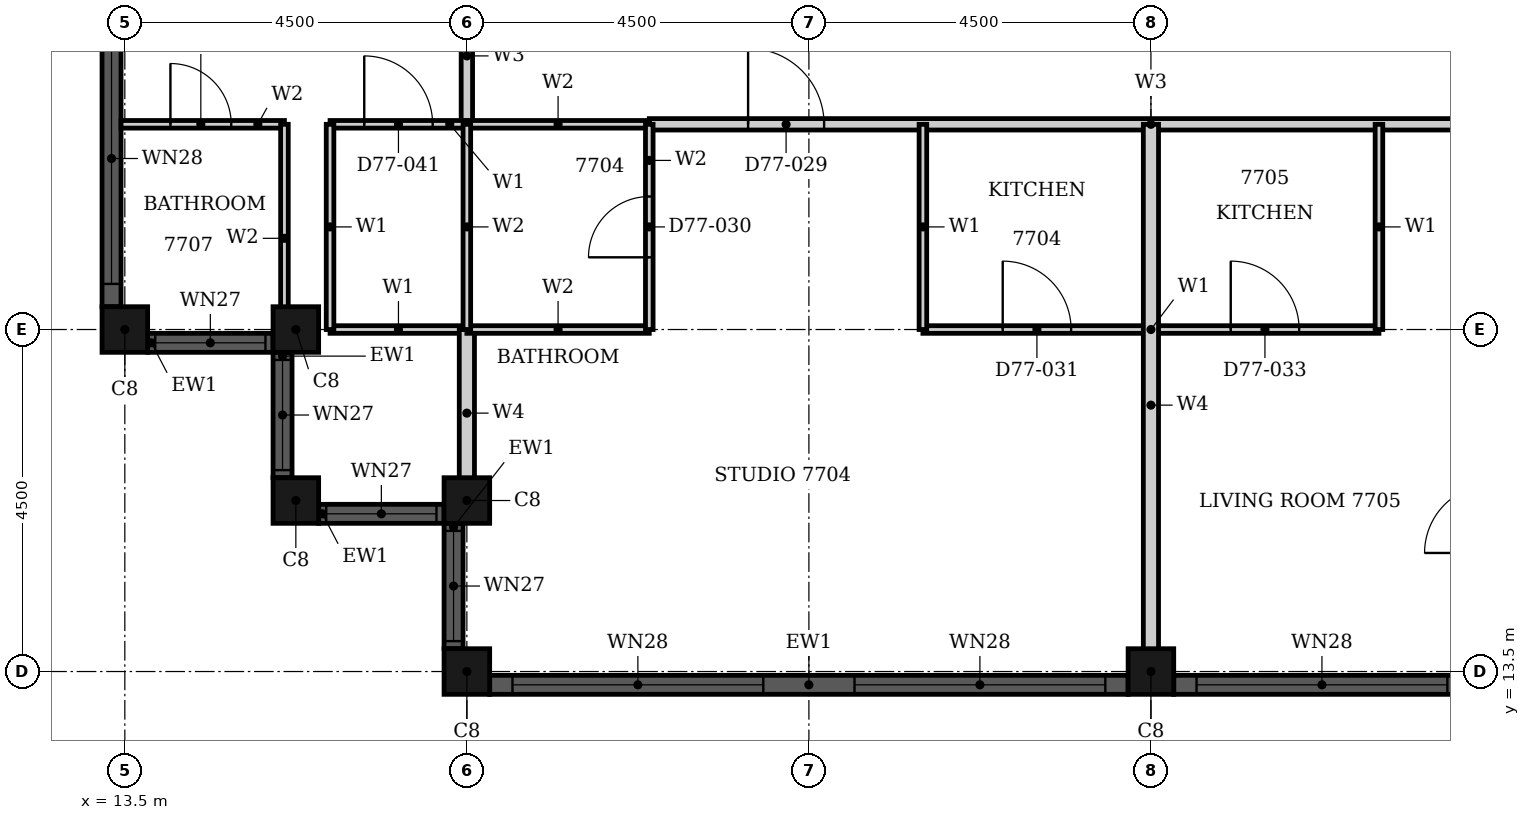
"""IFC4 building model, lengths in metres.
Left out: names, types, materials, properties, quantities, classifications, styles, units other than length and angle.
Written with IfcOpenShell. Run it as: python <this file> out.ifc"""

import sys

from ifc_helpers import new_model, si_unit, direction, frame, frame_2d, origin, origin_2d, place, context, subcontext, project, spatial, rectangle, hollow_rectangle, extrude, element, fill, save


model = new_model("IFC4")
c1 = context("Model", 3, precision=1e-05, world=origin(), true_north=direction((0.0, 1.0)))
c2 = subcontext(c1, "Body", "Model", "MODEL_VIEW")
j1 = project(units=[si_unit("LENGTHUNIT", "METRE"), si_unit("PLANEANGLEUNIT", "RADIAN")], contexts=[c1])
p1 = place(None, origin())
s1 = spatial("IfcSite", under=j1, at=p1, CompositionType="ELEMENT")
p2 = place(p1, origin())
s2 = spatial("IfcBuilding", under=s1, at=p2, CompositionType="ELEMENT")
p3 = place(p2, frame((0.0, 0.0, 301.9)))
s3 = spatial("IfcBuildingStorey", under=s2, at=p3, CompositionType="ELEMENT", Elevation=301.9)
for number, where, z_axis, x_axis in (
    (1, (13.5, 18.0, 0.0), (0.0, 0.0, 1.0), (1.0, 0.0, 0.0)),
    (2, (15.75, 18.0, 0.0), (0.0, 0.0, 1.0), (1.0, 0.0, 0.0)),
    (3, (15.75, 15.75, 0.0), (0.0, 0.0, 1.0), (1.0, 0.0, 0.0)),
    (4, (18.0, 15.75, 0.0), (0.0, 0.0, 1.0), (1.0, 0.0, 0.0)),
    (5, (18.0, 13.5, 0.0), (0.0, 0.0, 1.0), (1.0, 0.0, 0.0)),
    (6, (27.0, 13.5, 0.0), (0.0, 0.0, 1.0), (1.0, 0.0, 0.0)),
):
    element("IfcColumn", number, at=place(p3, frame(where, z_axis=z_axis, x_axis=x_axis)), inside=s3, PredefinedType="COLUMN", context=c2, shape_type="SweptSolid", body=[
        extrude(hollow_rectangle(XDim=0.6, YDim=0.6, WallThickness=0.02, at=origin_2d()), origin(), (0.0, 0.0, 1.0), 3.7),
    ])
p4 = place(p3, frame((13.325, 26.7, 0.0), z_axis=(0.0, 0.0, 1.0), x_axis=(0.0, -1.0, 0.0)))
e7 = element("IfcWall", 7, at=p4, inside=s3, PredefinedType="SOLIDWALL", context=c2, shape_type="SweptSolid", body=[
    extrude(rectangle(XDim=8.4, YDim=0.25, at=frame_2d((4.2, 0.0))), origin(), (0.0, 0.0, 1.0), 3.7),
])
p5 = place(p4, frame((0.3, 0.0, 0.45)))
e8 = element("IfcOpeningElement", 8, at=p5, cuts=e7, PredefinedType="OPENING", context=c2, shape_type="SweptSolid", body=[
    extrude(rectangle(XDim=3.3, YDim=1.8, at=frame_2d((1.65, 0.9))), frame((0.0, 0.135, 0.0), z_axis=(0.0, -1.0, 0.0), x_axis=(1.0, 0.0, 0.0)), (0.0, 0.0, 1.0), 0.27),
])
p6 = place(p4, frame((4.8, 0.0, 0.45)))
e9 = element("IfcOpeningElement", 9, at=p6, cuts=e7, PredefinedType="OPENING", context=c2, shape_type="SweptSolid", body=[
    extrude(rectangle(XDim=3.3, YDim=1.8, at=frame_2d((1.65, 0.9))), frame((0.0, 0.135, 0.0), z_axis=(0.0, -1.0, 0.0), x_axis=(1.0, 0.0, 0.0)), (0.0, 0.0, 1.0), 0.27),
])
p7 = place(p3, frame((13.8, 17.825, 0.0), z_axis=(0.0, 0.0, 1.0), x_axis=(1.0, 0.0, 0.0)))
e10 = element("IfcWall", 10, at=p7, inside=s3, PredefinedType="SOLIDWALL", context=c2, shape_type="SweptSolid", body=[
    extrude(rectangle(XDim=1.65, YDim=0.25, at=frame_2d((0.825, 0.0))), origin(), (0.0, 0.0, 1.0), 3.7),
])
p8 = place(p7, frame((0.1, 0.0, 0.9)))
e11 = element("IfcOpeningElement", 11, at=p8, cuts=e10, PredefinedType="OPENING", context=c2, shape_type="SweptSolid", body=[
    extrude(rectangle(XDim=1.45, YDim=1.35, at=frame_2d((0.725, 0.675))), frame((0.0, 0.135, 0.0), z_axis=(0.0, -1.0, 0.0), x_axis=(1.0, 0.0, 0.0)), (0.0, 0.0, 1.0), 0.27),
])
p9 = place(p3, frame((15.575, 17.7, 0.0), z_axis=(0.0, 0.0, 1.0), x_axis=(0.0, -1.0, 0.0)))
e12 = element("IfcWall", 12, at=p9, inside=s3, PredefinedType="SOLIDWALL", context=c2, shape_type="SweptSolid", body=[
    extrude(rectangle(XDim=1.65, YDim=0.25, at=frame_2d((0.825, 0.0))), origin(), (0.0, 0.0, 1.0), 3.7),
])
p10 = place(p9, frame((0.1, 0.0, 0.9)))
e13 = element("IfcOpeningElement", 13, at=p10, cuts=e12, PredefinedType="OPENING", context=c2, shape_type="SweptSolid", body=[
    extrude(rectangle(XDim=1.45, YDim=1.35, at=frame_2d((0.725, 0.675))), frame((0.0, 0.135, 0.0), z_axis=(0.0, -1.0, 0.0), x_axis=(1.0, 0.0, 0.0)), (0.0, 0.0, 1.0), 0.27),
])
p11 = place(p3, frame((16.05, 15.575, 0.0), z_axis=(0.0, 0.0, 1.0), x_axis=(1.0, 0.0, 0.0)))
e14 = element("IfcWall", 14, at=p11, inside=s3, PredefinedType="SOLIDWALL", context=c2, shape_type="SweptSolid", body=[
    extrude(rectangle(XDim=1.65, YDim=0.25, at=frame_2d((0.825, 0.0))), origin(), (0.0, 0.0, 1.0), 3.7),
])
p12 = place(p11, frame((0.1, 0.0, 0.9)))
e15 = element("IfcOpeningElement", 15, at=p12, cuts=e14, PredefinedType="OPENING", context=c2, shape_type="SweptSolid", body=[
    extrude(rectangle(XDim=1.45, YDim=1.35, at=frame_2d((0.725, 0.675))), frame((0.0, 0.135, 0.0), z_axis=(0.0, -1.0, 0.0), x_axis=(1.0, 0.0, 0.0)), (0.0, 0.0, 1.0), 0.27),
])
p13 = place(p3, frame((17.825, 15.45, 0.0), z_axis=(0.0, 0.0, 1.0), x_axis=(0.0, -1.0, 0.0)))
e16 = element("IfcWall", 16, at=p13, inside=s3, PredefinedType="SOLIDWALL", context=c2, shape_type="SweptSolid", body=[
    extrude(rectangle(XDim=1.65, YDim=0.25, at=frame_2d((0.825, 0.0))), origin(), (0.0, 0.0, 1.0), 3.7),
])
p14 = place(p13, frame((0.1, 0.0, 0.9)))
e17 = element("IfcOpeningElement", 17, at=p14, cuts=e16, PredefinedType="OPENING", context=c2, shape_type="SweptSolid", body=[
    extrude(rectangle(XDim=1.45, YDim=1.35, at=frame_2d((0.725, 0.675))), frame((0.0, 0.135, 0.0), z_axis=(0.0, -1.0, 0.0), x_axis=(1.0, 0.0, 0.0)), (0.0, 0.0, 1.0), 0.27),
])
p15 = place(p3, frame((18.3, 13.325, 0.0), z_axis=(0.0, 0.0, 1.0), x_axis=(1.0, 0.0, 0.0)))
e18 = element("IfcWall", 18, at=p15, inside=s3, PredefinedType="SOLIDWALL", context=c2, shape_type="SweptSolid", body=[
    extrude(rectangle(XDim=8.4, YDim=0.25, at=frame_2d((4.2, 0.0))), origin(), (0.0, 0.0, 1.0), 3.7),
])
p16 = place(p15, frame((0.3, 0.0, 0.45)))
e19 = element("IfcOpeningElement", 19, at=p16, cuts=e18, PredefinedType="OPENING", context=c2, shape_type="SweptSolid", body=[
    extrude(rectangle(XDim=3.3, YDim=1.8, at=frame_2d((1.65, 0.9))), frame((0.0, 0.135, 0.0), z_axis=(0.0, -1.0, 0.0), x_axis=(1.0, 0.0, 0.0)), (0.0, 0.0, 1.0), 0.27),
])
p17 = place(p15, frame((4.8, 0.0, 0.45)))
e20 = element("IfcOpeningElement", 20, at=p17, cuts=e18, PredefinedType="OPENING", context=c2, shape_type="SweptSolid", body=[
    extrude(rectangle(XDim=3.3, YDim=1.8, at=frame_2d((1.65, 0.9))), frame((0.0, 0.135, 0.0), z_axis=(0.0, -1.0, 0.0), x_axis=(1.0, 0.0, 0.0)), (0.0, 0.0, 1.0), 0.27),
])
p18 = place(p3, frame((27.3, 13.325, 0.0), z_axis=(0.0, 0.0, 1.0), x_axis=(1.0, 0.0, 0.0)))
e21 = element("IfcWall", 21, at=p18, inside=s3, PredefinedType="SOLIDWALL", context=c2, shape_type="SweptSolid", body=[
    extrude(rectangle(XDim=8.4, YDim=0.25, at=frame_2d((4.2, 0.0))), origin(), (0.0, 0.0, 1.0), 3.7),
])
p19 = place(p18, frame((0.3, 0.0, 0.45)))
e22 = element("IfcOpeningElement", 22, at=p19, cuts=e21, PredefinedType="OPENING", context=c2, shape_type="SweptSolid", body=[
    extrude(rectangle(XDim=3.3, YDim=1.8, at=frame_2d((1.65, 0.9))), frame((0.0, 0.135, 0.0), z_axis=(0.0, -1.0, 0.0), x_axis=(1.0, 0.0, 0.0)), (0.0, 0.0, 1.0), 0.27),
])
p20 = place(p18, frame((4.8, 0.0, 0.45)))
e23 = element("IfcOpeningElement", 23, at=p20, cuts=e21, PredefinedType="OPENING", context=c2, shape_type="SweptSolid", body=[
    extrude(rectangle(XDim=3.3, YDim=1.8, at=frame_2d((1.65, 0.9))), frame((0.0, 0.135, 0.0), z_axis=(0.0, -1.0, 0.0), x_axis=(1.0, 0.0, 0.0)), (0.0, 0.0, 1.0), 0.27),
])
p21 = place(p3, frame((20.4, 20.7, 0.0), z_axis=(0.0, 0.0, 1.0), x_axis=(1.0, 0.0, 0.0)))
e24 = element("IfcWall", 24, at=p21, inside=s3, PredefinedType="PARTITIONING", context=c2, shape_type="SweptSolid", body=[
    extrude(rectangle(XDim=13.2, YDim=0.15, at=frame_2d((6.6, 0.0))), origin(), (0.0, 0.0, 1.0), 3.2),
])
p22 = place(p21, frame((1.3, 0.0, 0.0)))
e25 = element("IfcOpeningElement", 25, at=p22, cuts=e24, PredefinedType="OPENING", context=c2, shape_type="SweptSolid", body=[
    extrude(rectangle(XDim=1.0, YDim=2.2, at=frame_2d((0.5, 1.1))), frame((0.0, 0.085, 0.0), z_axis=(0.0, -1.0, 0.0), x_axis=(1.0, 0.0, 0.0)), (0.0, 0.0, 1.0), 0.17),
])
p23 = place(p21, frame((10.9, 0.0, 0.0)))
e26 = element("IfcOpeningElement", 26, at=p23, cuts=e24, PredefinedType="OPENING", context=c2, shape_type="SweptSolid", body=[
    extrude(rectangle(XDim=1.0, YDim=2.2, at=frame_2d((0.5, 1.1))), frame((0.0, 0.085, 0.0), z_axis=(0.0, -1.0, 0.0), x_axis=(1.0, 0.0, 0.0)), (0.0, 0.0, 1.0), 0.17),
])
p24 = place(p3, frame((18.0, 20.7, 0.0), z_axis=(0.0, 0.0, 1.0), x_axis=(0.0, 1.0, 0.0)))
e27 = element("IfcWall", 27, at=p24, inside=s3, PredefinedType="PARTITIONING", context=c2, shape_type="SweptSolid", body=[
    extrude(rectangle(XDim=1.8, YDim=0.15, at=frame_2d((0.9, 0.0))), origin(), (0.0, 0.0, 1.0), 3.2),
])
p25 = place(p3, frame((24.0, 18.0, 0.0), z_axis=(0.0, 0.0, 1.0), x_axis=(1.0, 0.0, 0.0)))
e28 = element("IfcWall", 28, at=p25, inside=s3, PredefinedType="PARTITIONING", context=c2, shape_type="SweptSolid", body=[
    extrude(rectangle(XDim=6.0, YDim=0.1, at=frame_2d((3.0, 0.0))), origin(), (0.0, 0.0, 1.0), 3.2),
])
p26 = place(p25, frame((1.05, 0.0, 0.0)))
e29 = element("IfcOpeningElement", 29, at=p26, cuts=e28, PredefinedType="OPENING", context=c2, shape_type="SweptSolid", body=[
    extrude(rectangle(XDim=0.9, YDim=2.1, at=frame_2d((0.45, 1.05))), frame((0.0, 0.06, 0.0), z_axis=(0.0, -1.0, 0.0), x_axis=(1.0, 0.0, 0.0)), (0.0, 0.0, 1.0), 0.12),
])
p27 = place(p25, frame((4.05, 0.0, 0.0)))
e30 = element("IfcOpeningElement", 30, at=p27, cuts=e28, PredefinedType="OPENING", context=c2, shape_type="SweptSolid", body=[
    extrude(rectangle(XDim=0.9, YDim=2.1, at=frame_2d((0.45, 1.05))), frame((0.0, 0.06, 0.0), z_axis=(0.0, -1.0, 0.0), x_axis=(1.0, 0.0, 0.0)), (0.0, 0.0, 1.0), 0.12),
])
p28 = place(p3, frame((16.2, 18.0, 0.0), z_axis=(0.0, 0.0, 1.0), x_axis=(1.0, 0.0, 0.0)))
e31 = element("IfcWall", 31, at=p28, inside=s3, PredefinedType="PARTITIONING", context=c2, shape_type="SweptSolid", body=[
    extrude(rectangle(XDim=1.8, YDim=0.1, at=frame_2d((0.9, 0.0))), origin(), (0.0, 0.0, 1.0), 3.2),
])
p29 = place(p3, frame((16.2, 20.7, 0.0), z_axis=(0.0, 0.0, 1.0), x_axis=(1.0, 0.0, 0.0)))
e32 = element("IfcWall", 32, at=p29, inside=s3, PredefinedType="PARTITIONING", context=c2, shape_type="SweptSolid", body=[
    extrude(rectangle(XDim=1.8, YDim=0.1, at=frame_2d((0.9, 0.0))), origin(), (0.0, 0.0, 1.0), 3.2),
])
p30 = place(p29, frame((0.45, 0.0, 0.0)))
e33 = element("IfcOpeningElement", 33, at=p30, cuts=e32, PredefinedType="OPENING", context=c2, shape_type="SweptSolid", body=[
    extrude(rectangle(XDim=0.9, YDim=2.1, at=frame_2d((0.45, 1.05))), frame((0.0, 0.06, 0.0), z_axis=(0.0, -1.0, 0.0), x_axis=(1.0, 0.0, 0.0)), (0.0, 0.0, 1.0), 0.12),
])
for number, where, z_axis, x_axis in (
    (34, (16.2, 18.0, 0.0), (0.0, 0.0, 1.0), (0.0, 1.0, 0.0)),
    (35, (24.0, 18.0, 0.0), (0.0, 0.0, 1.0), (0.0, 1.0, 0.0)),
    (36, (30.0, 18.0, 0.0), (0.0, 0.0, 1.0), (0.0, 1.0, 0.0)),
):
    element("IfcWall", number, at=place(p3, frame(where, z_axis=z_axis, x_axis=x_axis)), inside=s3, PredefinedType="PARTITIONING", context=c2, shape_type="SweptSolid", body=[
        extrude(rectangle(XDim=2.7, YDim=0.1, at=frame_2d((1.35, 0.0))), origin(), (0.0, 0.0, 1.0), 3.2),
    ])
p31 = place(p3, frame((18.0, 15.8, 0.0), z_axis=(0.0, 0.0, 1.0), x_axis=(0.0, 1.0, 0.0)))
e37 = element("IfcWall", 37, at=p31, inside=s3, PredefinedType="PARTITIONING", context=c2, shape_type="SweptSolid", body=[
    extrude(rectangle(XDim=2.2, YDim=0.2, at=frame_2d((1.1, 0.0))), origin(), (0.0, 0.0, 1.0), 3.2),
])
p32 = place(p3, frame((27.0, 13.31, 0.0), z_axis=(0.0, 0.0, 1.0), x_axis=(0.0, 1.0, 0.0)))
e38 = element("IfcWall", 38, at=p32, inside=s3, PredefinedType="PARTITIONING", context=c2, shape_type="SweptSolid", body=[
    extrude(rectangle(XDim=7.39, YDim=0.2, at=frame_2d((3.695, 0.0))), origin(), (0.0, 0.0, 1.0), 3.2),
])
for number, where, z_axis, x_axis in (
    (39, (18.0, 18.0, 0.0), (0.0, 0.0, 1.0), (1.0, 0.0, 0.0)),
    (40, (18.0, 20.7, 0.0), (0.0, 0.0, 1.0), (1.0, 0.0, 0.0)),
):
    element("IfcWall", number, at=place(p3, frame(where, z_axis=z_axis, x_axis=x_axis)), inside=s3, PredefinedType="PARTITIONING", context=c2, shape_type="SweptSolid", body=[
        extrude(rectangle(XDim=2.4, YDim=0.1, at=frame_2d((1.2, 0.0))), origin(), (0.0, 0.0, 1.0), 3.2),
    ])
p33 = place(p3, frame((13.45, 20.7, 0.0), z_axis=(0.0, 0.0, 1.0), x_axis=(1.0, 0.0, 0.0)))
e41 = element("IfcWall", 41, at=p33, inside=s3, PredefinedType="PARTITIONING", context=c2, shape_type="SweptSolid", body=[
    extrude(rectangle(XDim=2.15, YDim=0.1, at=frame_2d((1.075, 0.0))), origin(), (0.0, 0.0, 1.0), 3.2),
])
p34 = place(p33, frame((0.65, 0.0, 0.0)))
e42 = element("IfcOpeningElement", 42, at=p34, cuts=e41, PredefinedType="OPENING", context=c2, shape_type="SweptSolid", body=[
    extrude(rectangle(XDim=0.8, YDim=2.1, at=frame_2d((0.4, 1.05))), frame((0.0, 0.06, 0.0), z_axis=(0.0, -1.0, 0.0), x_axis=(1.0, 0.0, 0.0)), (0.0, 0.0, 1.0), 0.12),
])
p35 = place(p3, frame((15.6, 17.7, 0.0), z_axis=(0.0, 0.0, 1.0), x_axis=(0.0, 1.0, 0.0)))
e43 = element("IfcWall", 43, at=p35, inside=s3, PredefinedType="PARTITIONING", context=c2, shape_type="SweptSolid", body=[
    extrude(rectangle(XDim=3.0, YDim=0.1, at=frame_2d((1.5, 0.0))), origin(), (0.0, 0.0, 1.0), 3.2),
])
p36 = place(p3, frame((18.0, 18.0, 0.0), z_axis=(0.0, 0.0, 1.0), x_axis=(0.0, 1.0, 0.0)))
e44 = element("IfcWall", 44, at=p36, inside=s3, PredefinedType="PARTITIONING", context=c2, shape_type="SweptSolid", body=[
    extrude(rectangle(XDim=2.7, YDim=0.1, at=frame_2d((1.35, 0.0))), origin(), (0.0, 0.0, 1.0), 3.2),
])
p37 = place(p3, frame((20.4, 18.0, 0.0), z_axis=(0.0, 0.0, 1.0), x_axis=(0.0, 1.0, 0.0)))
e45 = element("IfcWall", 45, at=p37, inside=s3, PredefinedType="PARTITIONING", context=c2, shape_type="SweptSolid", body=[
    extrude(rectangle(XDim=2.7, YDim=0.1, at=frame_2d((1.35, 0.0))), origin(), (0.0, 0.0, 1.0), 3.2),
])
p38 = place(p37, frame((0.95, 0.0, 0.0)))
e46 = element("IfcOpeningElement", 46, at=p38, cuts=e45, PredefinedType="OPENING", context=c2, shape_type="SweptSolid", body=[
    extrude(rectangle(XDim=0.8, YDim=2.1, at=frame_2d((0.4, 1.05))), frame((0.0, 0.06, 0.0), z_axis=(0.0, -1.0, 0.0), x_axis=(1.0, 0.0, 0.0)), (0.0, 0.0, 1.0), 0.12),
])
p39 = place(p6, origin())
e47 = element("IfcWindow", 47, at=p39, inside=s3, PartitioningType="SINGLE_PANEL", PredefinedType="WINDOW", context=c2, shape_type="SweptSolid", body=[
    extrude(rectangle(XDim=3.3, YDim=1.8, at=frame_2d((1.65, 0.9))), frame((0.0, 0.03, 0.0), z_axis=(0.0, -1.0, 0.0), x_axis=(1.0, 0.0, 0.0)), (0.0, 0.0, 1.0), 0.06),
])
fill(e9, e47)
p40 = place(p8, origin())
e48 = element("IfcWindow", 48, at=p40, inside=s3, PartitioningType="SINGLE_PANEL", PredefinedType="WINDOW", context=c2, shape_type="SweptSolid", body=[
    extrude(rectangle(XDim=1.45, YDim=1.35, at=frame_2d((0.725, 0.675))), frame((0.0, 0.03, 0.0), z_axis=(0.0, -1.0, 0.0), x_axis=(1.0, 0.0, 0.0)), (0.0, 0.0, 1.0), 0.06),
])
fill(e11, e48)
p41 = place(p10, origin())
e49 = element("IfcWindow", 49, at=p41, inside=s3, PartitioningType="SINGLE_PANEL", PredefinedType="WINDOW", context=c2, shape_type="SweptSolid", body=[
    extrude(rectangle(XDim=1.45, YDim=1.35, at=frame_2d((0.725, 0.675))), frame((0.0, 0.03, 0.0), z_axis=(0.0, -1.0, 0.0), x_axis=(1.0, 0.0, 0.0)), (0.0, 0.0, 1.0), 0.06),
])
fill(e13, e49)
p42 = place(p12, origin())
e50 = element("IfcWindow", 50, at=p42, inside=s3, PartitioningType="SINGLE_PANEL", PredefinedType="WINDOW", context=c2, shape_type="SweptSolid", body=[
    extrude(rectangle(XDim=1.45, YDim=1.35, at=frame_2d((0.725, 0.675))), frame((0.0, 0.03, 0.0), z_axis=(0.0, -1.0, 0.0), x_axis=(1.0, 0.0, 0.0)), (0.0, 0.0, 1.0), 0.06),
])
fill(e15, e50)
p43 = place(p14, origin())
e51 = element("IfcWindow", 51, at=p43, inside=s3, PartitioningType="SINGLE_PANEL", PredefinedType="WINDOW", context=c2, shape_type="SweptSolid", body=[
    extrude(rectangle(XDim=1.45, YDim=1.35, at=frame_2d((0.725, 0.675))), frame((0.0, 0.03, 0.0), z_axis=(0.0, -1.0, 0.0), x_axis=(1.0, 0.0, 0.0)), (0.0, 0.0, 1.0), 0.06),
])
fill(e17, e51)
p44 = place(p16, origin())
e52 = element("IfcWindow", 52, at=p44, inside=s3, PartitioningType="SINGLE_PANEL", PredefinedType="WINDOW", context=c2, shape_type="SweptSolid", body=[
    extrude(rectangle(XDim=3.3, YDim=1.8, at=frame_2d((1.65, 0.9))), frame((0.0, 0.03, 0.0), z_axis=(0.0, -1.0, 0.0), x_axis=(1.0, 0.0, 0.0)), (0.0, 0.0, 1.0), 0.06),
])
fill(e19, e52)
p45 = place(p17, origin())
e53 = element("IfcWindow", 53, at=p45, inside=s3, PartitioningType="SINGLE_PANEL", PredefinedType="WINDOW", context=c2, shape_type="SweptSolid", body=[
    extrude(rectangle(XDim=3.3, YDim=1.8, at=frame_2d((1.65, 0.9))), frame((0.0, 0.03, 0.0), z_axis=(0.0, -1.0, 0.0), x_axis=(1.0, 0.0, 0.0)), (0.0, 0.0, 1.0), 0.06),
])
fill(e20, e53)
p46 = place(p19, origin())
e54 = element("IfcWindow", 54, at=p46, inside=s3, PartitioningType="SINGLE_PANEL", PredefinedType="WINDOW", context=c2, shape_type="SweptSolid", body=[
    extrude(rectangle(XDim=3.3, YDim=1.8, at=frame_2d((1.65, 0.9))), frame((0.0, 0.03, 0.0), z_axis=(0.0, -1.0, 0.0), x_axis=(1.0, 0.0, 0.0)), (0.0, 0.0, 1.0), 0.06),
])
fill(e22, e54)
p47 = place(p22, origin())
e55 = element("IfcDoor", 55, at=p47, inside=s3, OperationType="SINGLE_SWING_LEFT", PredefinedType="DOOR", context=c2, shape_type="SweptSolid", body=[
    extrude(rectangle(XDim=1.0, YDim=2.2, at=frame_2d((0.5, 1.1))), frame((0.0, 0.025, 0.0), z_axis=(0.0, -1.0, 0.0), x_axis=(1.0, 0.0, 0.0)), (0.0, 0.0, 1.0), 0.05),
])
fill(e25, e55)
p48 = place(p38, origin())
e56 = element("IfcDoor", 56, at=p48, inside=s3, OperationType="SINGLE_SWING_RIGHT", PredefinedType="DOOR", context=c2, shape_type="SweptSolid", body=[
    extrude(rectangle(XDim=0.8, YDim=2.1, at=frame_2d((0.4, 1.05))), frame((0.0, 0.025, 0.0), z_axis=(0.0, -1.0, 0.0), x_axis=(1.0, 0.0, 0.0)), (0.0, 0.0, 1.0), 0.05),
])
fill(e46, e56)
p49 = place(p26, origin())
e57 = element("IfcDoor", 57, at=p49, inside=s3, OperationType="SINGLE_SWING_LEFT", PredefinedType="DOOR", context=c2, shape_type="SweptSolid", body=[
    extrude(rectangle(XDim=0.9, YDim=2.1, at=frame_2d((0.45, 1.05))), frame((0.0, 0.025, 0.0), z_axis=(0.0, -1.0, 0.0), x_axis=(1.0, 0.0, 0.0)), (0.0, 0.0, 1.0), 0.05),
])
fill(e29, e57)
p50 = place(p27, origin())
e58 = element("IfcDoor", 58, at=p50, inside=s3, OperationType="SINGLE_SWING_LEFT", PredefinedType="DOOR", context=c2, shape_type="SweptSolid", body=[
    extrude(rectangle(XDim=0.9, YDim=2.1, at=frame_2d((0.45, 1.05))), frame((0.0, 0.025, 0.0), z_axis=(0.0, -1.0, 0.0), x_axis=(1.0, 0.0, 0.0)), (0.0, 0.0, 1.0), 0.05),
])
fill(e30, e58)
p51 = place(p34, origin())
e59 = element("IfcDoor", 59, at=p51, inside=s3, OperationType="SINGLE_SWING_LEFT", PredefinedType="DOOR", context=c2, shape_type="SweptSolid", body=[
    extrude(rectangle(XDim=0.8, YDim=2.1, at=frame_2d((0.4, 1.05))), frame((0.0, 0.025, 0.0), z_axis=(0.0, -1.0, 0.0), x_axis=(1.0, 0.0, 0.0)), (0.0, 0.0, 1.0), 0.05),
])
fill(e42, e59)
p52 = place(p30, origin())
e60 = element("IfcDoor", 60, at=p52, inside=s3, OperationType="SINGLE_SWING_RIGHT", PredefinedType="DOOR", context=c2, shape_type="SweptSolid", body=[
    extrude(rectangle(XDim=0.9, YDim=2.1, at=frame_2d((0.45, 1.05))), frame((0.0, 0.025, 0.0), z_axis=(0.0, -1.0, 0.0), x_axis=(1.0, 0.0, 0.0)), (0.0, 0.0, 1.0), 0.05),
])
fill(e33, e60)
save(model, sys.argv[1])
